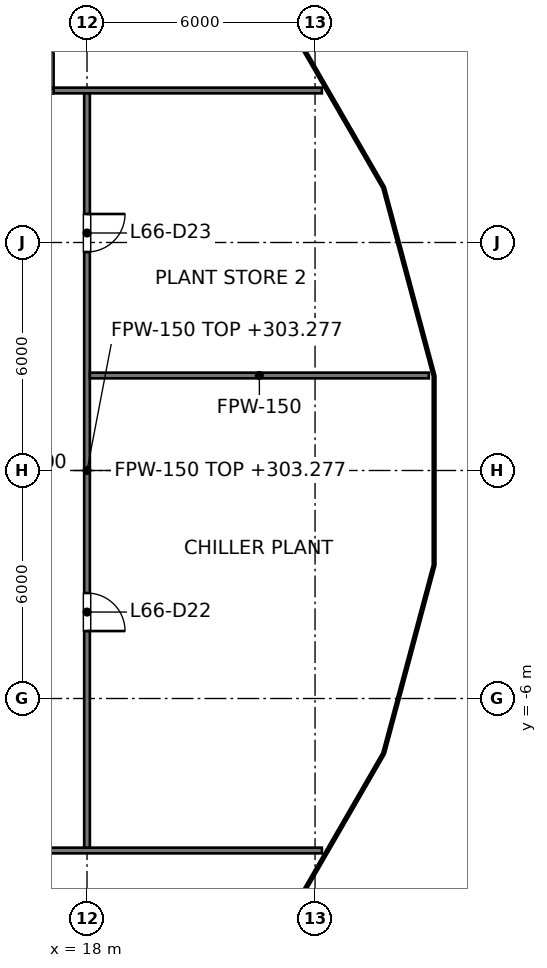
"""IFC4 building model, lengths in metres.
Left out: names, types, materials, properties, quantities, classifications, styles, units other than length and angle.
Written with IfcOpenShell. Run it as: python <this file> out.ifc"""

import sys

from ifc_helpers import new_model, si_unit, direction, frame, frame_2d, origin, place, context, subcontext, project, spatial, rectangle, extrude, element, fill, save


model = new_model("IFC4")
c1 = context("Model", 3, precision=1e-05, world=origin(), true_north=direction((0.0, 1.0)))
c2 = subcontext(c1, "Body", "Model", "MODEL_VIEW")
j1 = project(units=[si_unit("LENGTHUNIT", "METRE"), si_unit("PLANEANGLEUNIT", "RADIAN")], contexts=[c1])
p1 = place(None, origin())
s1 = spatial("IfcSite", under=j1, at=p1, CompositionType="ELEMENT")
p2 = place(p1, origin())
s2 = spatial("IfcBuilding", under=s1, at=p2, CompositionType="ELEMENT")
p3 = place(p2, frame((0.0, 0.0, 299.0)))
s3 = spatial("IfcBuildingStorey", under=s2, at=p3, CompositionType="ELEMENT", Elevation=299.0)
p4 = place(p3, frame((-24.179, 10.0, 0.0), z_axis=(0.0, 0.0, 1.0), x_axis=(1.0, 0.0, 0.0)))
e1 = element("IfcWall", 1, at=p4, inside=s3, PredefinedType="PARTITIONING", context=c2, shape_type="SweptSolid", body=[
    extrude(rectangle(XDim=48.359, YDim=0.15, at=frame_2d((24.179, 0.0))), origin(), (0.0, 0.0, 1.0), 4.327),
])
p5 = place(p4, frame((9.05, 0.0, 0.0)))
e2 = element("IfcOpeningElement", 2, at=p5, cuts=e1, PredefinedType="OPENING", context=c2, shape_type="SweptSolid", body=[
    extrude(rectangle(XDim=1.0, YDim=2.1, at=frame_2d((0.5, 1.05))), frame((0.0, 0.075, 0.0), z_axis=(0.0, -1.0, 0.0), x_axis=(1.0, 0.0, 0.0)), (0.0, 0.0, 1.0), 0.15),
])
p6 = place(p4, frame((17.1, 0.0, 0.0)))
e3 = element("IfcOpeningElement", 3, at=p6, cuts=e1, PredefinedType="OPENING", context=c2, shape_type="SweptSolid", body=[
    extrude(rectangle(XDim=1.0, YDim=2.1, at=frame_2d((0.5, 1.05))), frame((0.0, 0.075, 0.0), z_axis=(0.0, -1.0, 0.0), x_axis=(1.0, 0.0, 0.0)), (0.0, 0.0, 1.0), 0.15),
])
p7 = place(p4, frame((33.3, 0.0, 0.0)))
e4 = element("IfcOpeningElement", 4, at=p7, cuts=e1, PredefinedType="OPENING", context=c2, shape_type="SweptSolid", body=[
    extrude(rectangle(XDim=1.0, YDim=2.1, at=frame_2d((0.5, 1.05))), frame((0.0, 0.075, 0.0), z_axis=(0.0, -1.0, 0.0), x_axis=(1.0, 0.0, 0.0)), (0.0, 0.0, 1.0), 0.15),
])
p8 = place(p4, frame((40.3, 0.0, 0.0)))
e5 = element("IfcOpeningElement", 5, at=p8, cuts=e1, PredefinedType="OPENING", context=c2, shape_type="SweptSolid", body=[
    extrude(rectangle(XDim=1.0, YDim=2.1, at=frame_2d((0.5, 1.05))), frame((0.0, 0.075, 0.0), z_axis=(0.0, -1.0, 0.0), x_axis=(1.0, 0.0, 0.0)), (0.0, 0.0, 1.0), 0.15),
])
p9 = place(p4, frame((24.25, 0.0, 0.0)))
e6 = element("IfcOpeningElement", 6, at=p9, cuts=e1, PredefinedType="OPENING", context=c2, shape_type="SweptSolid", body=[
    extrude(rectangle(XDim=1.8, YDim=2.1, at=frame_2d((0.9, 1.05))), frame((0.0, 0.075, 0.0), z_axis=(0.0, -1.0, 0.0), x_axis=(1.0, 0.0, 0.0)), (0.0, 0.0, 1.0), 0.15),
])
p10 = place(p3, frame((-24.179, -10.0, 0.0), z_axis=(0.0, 0.0, 1.0), x_axis=(1.0, 0.0, 0.0)))
e7 = element("IfcWall", 7, at=p10, inside=s3, PredefinedType="PARTITIONING", context=c2, shape_type="SweptSolid", body=[
    extrude(rectangle(XDim=48.359, YDim=0.15, at=frame_2d((24.179, 0.0))), origin(), (0.0, 0.0, 1.0), 4.327),
])
p11 = place(p10, frame((31.05, 0.0, 0.0)))
e8 = element("IfcOpeningElement", 8, at=p11, cuts=e7, PredefinedType="OPENING", context=c2, shape_type="SweptSolid", body=[
    extrude(rectangle(XDim=1.0, YDim=2.1, at=frame_2d((0.5, 1.05))), frame((0.0, 0.075, 0.0), z_axis=(0.0, -1.0, 0.0), x_axis=(1.0, 0.0, 0.0)), (0.0, 0.0, 1.0), 0.15),
])
p12 = place(p10, frame((39.05, 0.0, 0.0)))
e9 = element("IfcOpeningElement", 9, at=p12, cuts=e7, PredefinedType="OPENING", context=c2, shape_type="SweptSolid", body=[
    extrude(rectangle(XDim=1.0, YDim=2.1, at=frame_2d((0.5, 1.05))), frame((0.0, 0.075, 0.0), z_axis=(0.0, -1.0, 0.0), x_axis=(1.0, 0.0, 0.0)), (0.0, 0.0, 1.0), 0.15),
])
p13 = place(p10, frame((8.3, 0.0, 0.0)))
e10 = element("IfcOpeningElement", 10, at=p13, cuts=e7, PredefinedType="OPENING", context=c2, shape_type="SweptSolid", body=[
    extrude(rectangle(XDim=1.8, YDim=2.1, at=frame_2d((0.9, 1.05))), frame((0.0, 0.075, 0.0), z_axis=(0.0, -1.0, 0.0), x_axis=(1.0, 0.0, 0.0)), (0.0, 0.0, 1.0), 0.15),
])
p14 = place(p10, frame((22.35, 0.0, 0.0)))
e11 = element("IfcOpeningElement", 11, at=p14, cuts=e7, PredefinedType="OPENING", context=c2, shape_type="SweptSolid", body=[
    extrude(rectangle(XDim=1.8, YDim=2.1, at=frame_2d((0.9, 1.05))), frame((0.0, 0.075, 0.0), z_axis=(0.0, -1.0, 0.0), x_axis=(1.0, 0.0, 0.0)), (0.0, 0.0, 1.0), 0.15),
])
p15 = place(p3, frame((18.0, -9.925, 0.0), z_axis=(0.0, 0.0, 1.0), x_axis=(0.0, 1.0, 0.0)))
e12 = element("IfcWall", 12, at=p15, inside=s3, PredefinedType="PARTITIONING", context=c2, shape_type="SweptSolid", body=[
    extrude(rectangle(XDim=19.85, YDim=0.15, at=frame_2d((9.925, 0.0))), origin(), (0.0, 0.0, 1.0), 4.277),
])
p16 = place(p15, frame((5.7, 0.0, 0.0)))
e13 = element("IfcOpeningElement", 13, at=p16, cuts=e12, PredefinedType="OPENING", context=c2, shape_type="SweptSolid", body=[
    extrude(rectangle(XDim=1.0, YDim=2.1, at=frame_2d((0.5, 1.05))), frame((0.0, 0.075, 0.0), z_axis=(0.0, -1.0, 0.0), x_axis=(1.0, 0.0, 0.0)), (0.0, 0.0, 1.0), 0.15),
])
p17 = place(p15, frame((15.675, 0.0, 0.0)))
e14 = element("IfcOpeningElement", 14, at=p17, cuts=e12, PredefinedType="OPENING", context=c2, shape_type="SweptSolid", body=[
    extrude(rectangle(XDim=1.0, YDim=2.1, at=frame_2d((0.5, 1.05))), frame((0.0, 0.075, 0.0), z_axis=(0.0, -1.0, 0.0), x_axis=(1.0, 0.0, 0.0)), (0.0, 0.0, 1.0), 0.15),
])
p18 = place(p3, frame((18.075, 2.5, 0.0), z_axis=(0.0, 0.0, 1.0), x_axis=(1.0, 0.0, 0.0)))
e15 = element("IfcWall", 15, at=p18, inside=s3, PredefinedType="PARTITIONING", context=c2, shape_type="SweptSolid", body=[
    extrude(rectangle(XDim=8.92, YDim=0.15, at=frame_2d((4.46, 0.0))), origin(), (0.0, 0.0, 1.0), 4.327),
])
p19 = place(p8, origin())
e16 = element("IfcDoor", 16, at=p19, inside=s3, OperationType="SINGLE_SWING_RIGHT", PredefinedType="DOOR", context=c2, shape_type="SweptSolid", body=[
    extrude(rectangle(XDim=1.0, YDim=2.1, at=frame_2d((0.5, 1.05))), frame((0.0, 0.025, 0.0), z_axis=(0.0, -1.0, 0.0), x_axis=(1.0, 0.0, 0.0)), (0.0, 0.0, 1.0), 0.05),
])
fill(e5, e16)
p20 = place(p16, origin())
e17 = element("IfcDoor", 17, at=p20, inside=s3, OperationType="SINGLE_SWING_LEFT", PredefinedType="DOOR", context=c2, shape_type="SweptSolid", body=[
    extrude(rectangle(XDim=1.0, YDim=2.1, at=frame_2d((0.5, 1.05))), frame((0.0, 0.025, 0.0), z_axis=(0.0, -1.0, 0.0), x_axis=(1.0, 0.0, 0.0)), (0.0, 0.0, 1.0), 0.05),
])
fill(e13, e17)
p21 = place(p17, origin())
e18 = element("IfcDoor", 18, at=p21, inside=s3, OperationType="SINGLE_SWING_RIGHT", PredefinedType="DOOR", context=c2, shape_type="SweptSolid", body=[
    extrude(rectangle(XDim=1.0, YDim=2.1, at=frame_2d((0.5, 1.05))), frame((0.0, 0.025, 0.0), z_axis=(0.0, -1.0, 0.0), x_axis=(1.0, 0.0, 0.0)), (0.0, 0.0, 1.0), 0.05),
])
fill(e14, e18)
save(model, sys.argv[1])
